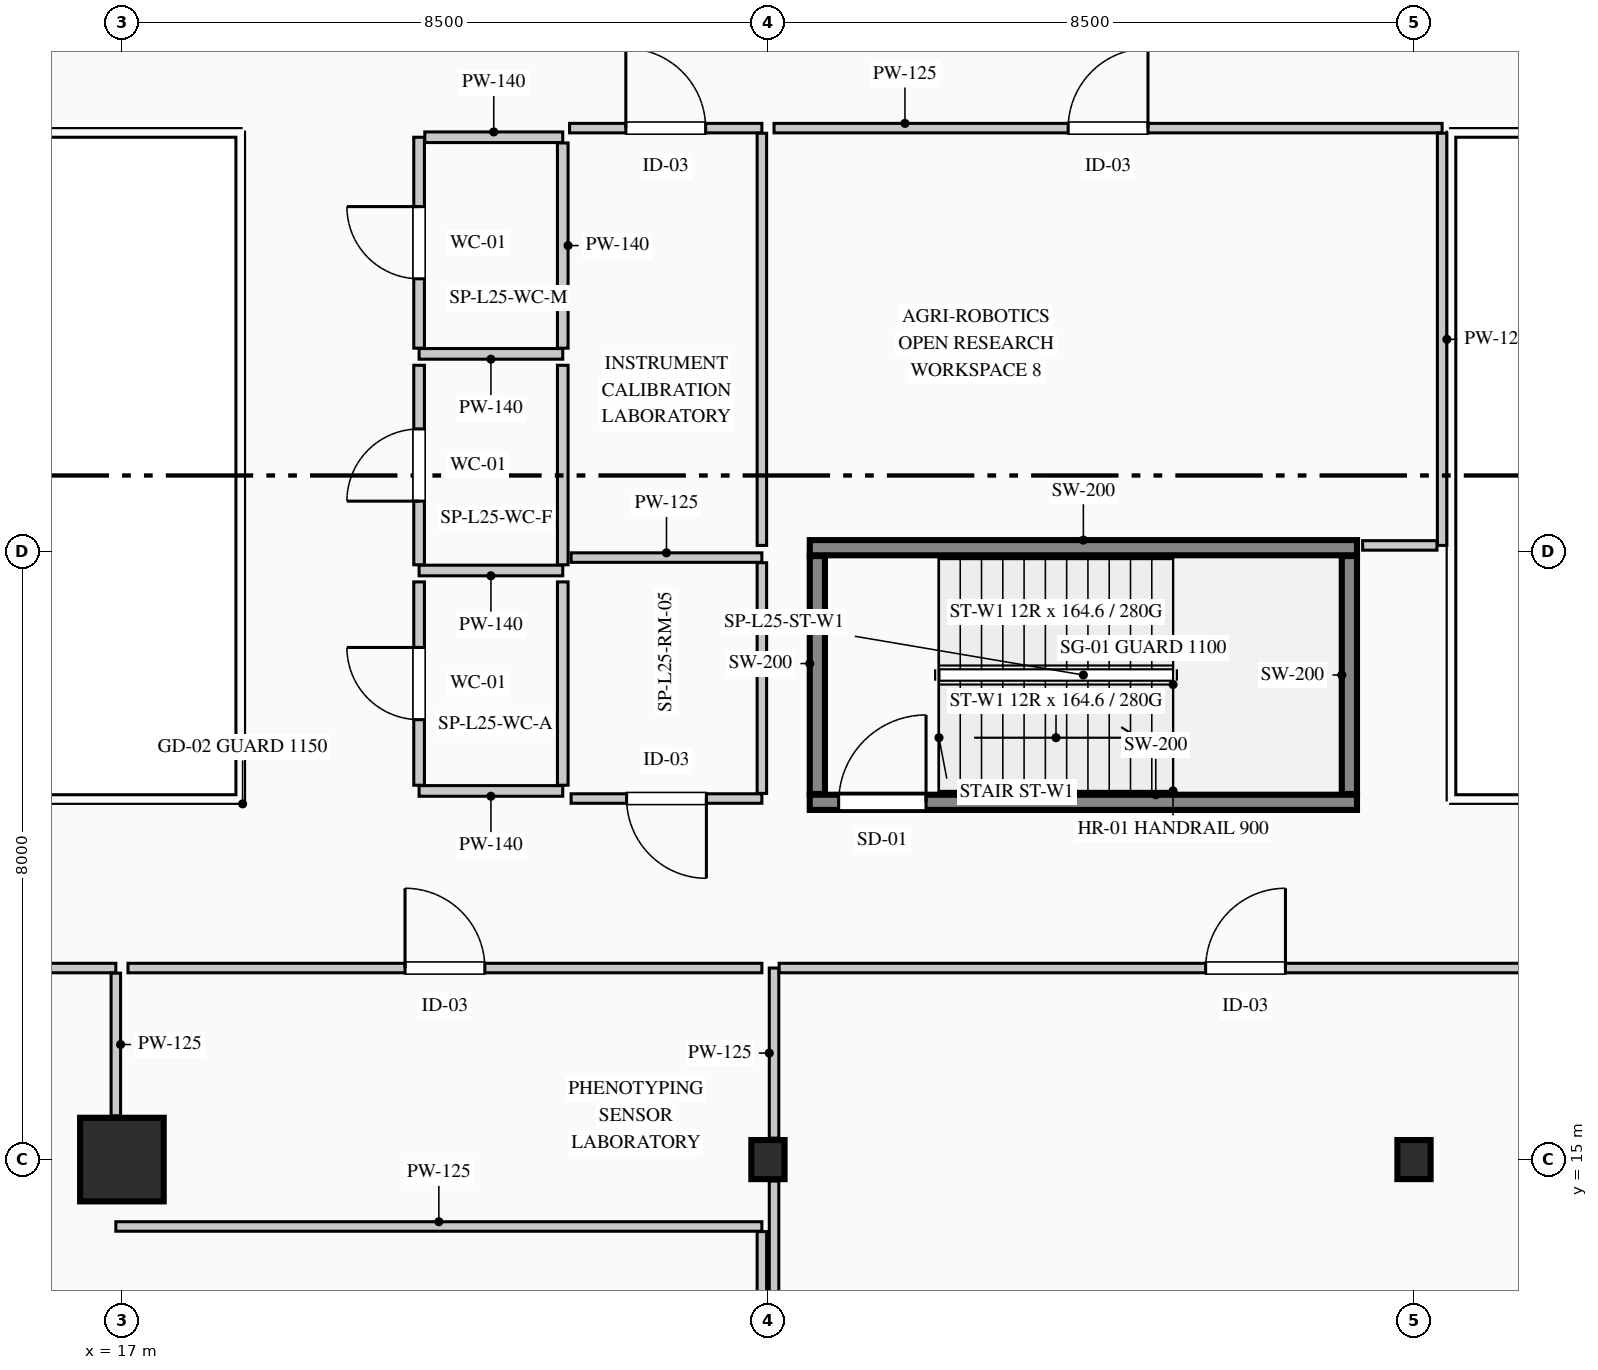
"""IFC4 building model, lengths in metres.
Left out: names, types, materials, properties, quantities, classifications, styles, units other than length and angle.
Written with IfcOpenShell. Run it as: python <this file> out.ifc"""

import sys

from ifc_helpers import new_model, si_unit, direction, frame, frame_2d, origin, origin_2d, place, context, subcontext, project, spatial, rectangle, i_section, extrude, element, fill, save


model = new_model("IFC4")
c1 = context("Model", 3, precision=1e-05, world=origin(), true_north=direction((0.0, 1.0)))
c2 = subcontext(c1, "Body", "Model", "MODEL_VIEW")
j1 = project(units=[si_unit("LENGTHUNIT", "METRE"), si_unit("PLANEANGLEUNIT", "RADIAN")], contexts=[c1])
p1 = place(None, origin())
s1 = spatial("IfcSite", under=j1, at=p1, CompositionType="ELEMENT")
p2 = place(p1, origin())
s2 = spatial("IfcBuilding", under=s1, at=p2, CompositionType="ELEMENT")
p3 = place(p2, frame((0.0, 0.0, 111.4)))
s3 = spatial("IfcBuildingStorey", under=s2, at=p3, CompositionType="ELEMENT", Elevation=111.4)
p4 = place(p3, frame((26.05, 19.7, 0.0), z_axis=(0.0, 0.0, 1.0), x_axis=(1.0, 0.0, 0.0)))
e1 = element("IfcWall", 1, at=p4, inside=s3, PredefinedType="SHEAR", context=c2, shape_type="SweptSolid", body=[
    extrude(rectangle(XDim=7.2, YDim=0.2, at=frame_2d((3.6, 0.0))), origin(), (0.0, 0.0, 1.0), 3.95),
])
p5 = place(p4, frame((0.38, 0.0, 0.0)))
e2 = element("IfcOpeningElement", 2, at=p5, cuts=e1, PredefinedType="OPENING", context=c2, shape_type="SweptSolid", body=[
    extrude(rectangle(XDim=1.15, YDim=2.2, at=frame_2d((0.575, 1.1))), frame((0.0, 0.11, 0.0), z_axis=(0.0, -1.0, 0.0), x_axis=(1.0, 0.0, 0.0)), (0.0, 0.0, 1.0), 0.22),
])
p6 = place(p3, frame((26.05, 23.05, 0.0), z_axis=(0.0, 0.0, 1.0), x_axis=(1.0, 0.0, 0.0)))
e3 = element("IfcWall", 3, at=p6, inside=s3, PredefinedType="SHEAR", context=c2, shape_type="SweptSolid", body=[
    extrude(rectangle(XDim=7.2, YDim=0.2, at=frame_2d((3.6, 0.0))), origin(), (0.0, 0.0, 1.0), 3.95),
])
for number, where, z_axis, x_axis in (
    (4, (26.15, 19.81, 0.0), (0.0, 0.0, 1.0), (0.0, 1.0, 0.0)),
    (5, (33.15, 19.81, 0.0), (0.0, 0.0, 1.0), (0.0, 1.0, 0.0)),
):
    element("IfcWall", number, at=place(p3, frame(where, z_axis=z_axis, x_axis=x_axis)), inside=s3, PredefinedType="SHEAR", context=c2, shape_type="SweptSolid", body=[
        extrude(rectangle(XDim=3.13, YDim=0.2, at=frame_2d((1.565, 0.0))), origin(), (0.0, 0.0, 1.0), 3.95),
    ])
p7 = place(p3, frame((17.0, 15.0, 0.0), z_axis=(0.0, 0.0, 1.0), x_axis=(1.0, 0.0, 0.0)))
e6 = element("IfcColumn", 6, at=p7, inside=s3, PredefinedType="COLUMN", context=c2, shape_type="SweptSolid", body=[
    extrude(rectangle(XDim=1.1, YDim=1.1, at=origin_2d()), origin(), (0.0, 0.0, 1.0), 3.95),
])
for number, where, z_axis, x_axis in (
    (7, (25.5, 15.0, 0.0), (0.0, 0.0, 1.0), (1.0, 0.0, 0.0)),
    (8, (34.0, 15.0, 0.0), (0.0, 0.0, 1.0), (1.0, 0.0, 0.0)),
):
    element("IfcColumn", number, at=place(p3, frame(where, z_axis=z_axis, x_axis=x_axis)), inside=s3, PredefinedType="COLUMN", context=c2, shape_type="SweptSolid", body=[
        extrude(i_section(OverallWidth=0.437, OverallDepth=0.514, WebThickness=0.061, FlangeThickness=0.077, FilletRadius=0.015, at=origin_2d()), origin(), (0.0, 0.0, 1.0), 3.95),
    ])
p8 = place(p3, frame((22.8, 25.6, 0.0), z_axis=(0.0, 0.0, 1.0), x_axis=(-1.0, 0.0, 0.0)))
e9 = element("IfcWall", 9, at=p8, inside=s3, PredefinedType="PARTITIONING", context=c2, shape_type="SweptSolid", body=[
    extrude(rectangle(XDim=1.89, YDim=0.14, at=frame_2d((0.945, 0.0))), origin(), (0.0, 0.0, 1.0), 3.69),
])
p9 = place(p3, frame((20.91, 25.675, 0.0), z_axis=(0.0, 0.0, 1.0), x_axis=(0.0, 1.0, 0.0)))
e10 = element("IfcWall", 10, at=p9, inside=s3, PredefinedType="PARTITIONING", context=c2, shape_type="SweptSolid", body=[
    extrude(rectangle(XDim=2.775, YDim=0.14, at=frame_2d((1.387, 0.0))), origin(), (0.0, 0.0, 1.0), 3.69),
])
p10 = place(p9, frame((0.913, 0.0, 0.0)))
e11 = element("IfcOpeningElement", 11, at=p10, cuts=e10, PredefinedType="OPENING", context=c2, shape_type="SweptSolid", body=[
    extrude(rectangle(XDim=0.95, YDim=2.15, at=frame_2d((0.475, 1.075))), frame((0.0, 0.08, 0.0), z_axis=(0.0, -1.0, 0.0), x_axis=(1.0, 0.0, 0.0)), (0.0, 0.0, 1.0), 0.16),
])
p11 = place(p3, frame((20.985, 28.45, 0.0), z_axis=(0.0, 0.0, 1.0), x_axis=(1.0, 0.0, 0.0)))
e12 = element("IfcWall", 12, at=p11, inside=s3, PredefinedType="PARTITIONING", context=c2, shape_type="SweptSolid", body=[
    extrude(rectangle(XDim=1.815, YDim=0.14, at=frame_2d((0.907, 0.0))), origin(), (0.0, 0.0, 1.0), 3.69),
])
p12 = place(p3, frame((22.8, 28.375, 0.0), z_axis=(0.0, 0.0, 1.0), x_axis=(0.0, -1.0, 0.0)))
e13 = element("IfcWall", 13, at=p12, inside=s3, PredefinedType="PARTITIONING", context=c2, shape_type="SweptSolid", body=[
    extrude(rectangle(XDim=2.7, YDim=0.14, at=frame_2d((1.35, 0.0))), origin(), (0.0, 0.0, 1.0), 3.315),
])
p13 = place(p3, frame((22.8, 22.75, 0.0), z_axis=(0.0, 0.0, 1.0), x_axis=(-1.0, 0.0, 0.0)))
e14 = element("IfcWall", 14, at=p13, inside=s3, PredefinedType="PARTITIONING", context=c2, shape_type="SweptSolid", body=[
    extrude(rectangle(XDim=1.89, YDim=0.14, at=frame_2d((0.945, 0.0))), origin(), (0.0, 0.0, 1.0), 3.69),
])
p14 = place(p3, frame((20.91, 22.825, 0.0), z_axis=(0.0, 0.0, 1.0), x_axis=(0.0, 1.0, 0.0)))
e15 = element("IfcWall", 15, at=p14, inside=s3, PredefinedType="PARTITIONING", context=c2, shape_type="SweptSolid", body=[
    extrude(rectangle(XDim=2.625, YDim=0.14, at=frame_2d((1.312, 0.0))), origin(), (0.0, 0.0, 1.0), 3.69),
])
p15 = place(p14, frame((0.837, 0.0, 0.0)))
e16 = element("IfcOpeningElement", 16, at=p15, cuts=e15, PredefinedType="OPENING", context=c2, shape_type="SweptSolid", body=[
    extrude(rectangle(XDim=0.95, YDim=2.15, at=frame_2d((0.475, 1.075))), frame((0.0, 0.08, 0.0), z_axis=(0.0, -1.0, 0.0), x_axis=(1.0, 0.0, 0.0)), (0.0, 0.0, 1.0), 0.16),
])
p16 = place(p3, frame((22.8, 25.45, 0.0), z_axis=(0.0, 0.0, 1.0), x_axis=(0.0, -1.0, 0.0)))
e17 = element("IfcWall", 17, at=p16, inside=s3, PredefinedType="PARTITIONING", context=c2, shape_type="SweptSolid", body=[
    extrude(rectangle(XDim=2.625, YDim=0.14, at=frame_2d((1.312, 0.0))), origin(), (0.0, 0.0, 1.0), 3.315),
])
p17 = place(p3, frame((22.8, 19.85, 0.0), z_axis=(0.0, 0.0, 1.0), x_axis=(-1.0, 0.0, 0.0)))
e18 = element("IfcWall", 18, at=p17, inside=s3, PredefinedType="PARTITIONING", context=c2, shape_type="SweptSolid", body=[
    extrude(rectangle(XDim=1.89, YDim=0.14, at=frame_2d((0.945, 0.0))), origin(), (0.0, 0.0, 1.0), 3.69),
])
p18 = place(p3, frame((20.91, 19.925, 0.0), z_axis=(0.0, 0.0, 1.0), x_axis=(0.0, 1.0, 0.0)))
e19 = element("IfcWall", 19, at=p18, inside=s3, PredefinedType="PARTITIONING", context=c2, shape_type="SweptSolid", body=[
    extrude(rectangle(XDim=2.675, YDim=0.14, at=frame_2d((1.337, 0.0))), origin(), (0.0, 0.0, 1.0), 3.69),
])
p19 = place(p18, frame((0.863, 0.0, 0.0)))
e20 = element("IfcOpeningElement", 20, at=p19, cuts=e19, PredefinedType="OPENING", context=c2, shape_type="SweptSolid", body=[
    extrude(rectangle(XDim=0.95, YDim=2.15, at=frame_2d((0.475, 1.075))), frame((0.0, 0.08, 0.0), z_axis=(0.0, -1.0, 0.0), x_axis=(1.0, 0.0, 0.0)), (0.0, 0.0, 1.0), 0.16),
])
p20 = place(p3, frame((22.8, 22.6, 0.0), z_axis=(0.0, 0.0, 1.0), x_axis=(0.0, -1.0, 0.0)))
e21 = element("IfcWall", 21, at=p20, inside=s3, PredefinedType="PARTITIONING", context=c2, shape_type="SweptSolid", body=[
    extrude(rectangle(XDim=2.675, YDim=0.14, at=frame_2d((1.337, 0.0))), origin(), (0.0, 0.0, 1.0), 3.315),
])
p21 = place(p3, frame((6.36, 17.52, 0.0), z_axis=(0.0, 0.0, 1.0), x_axis=(1.0, 0.0, 0.0)))
e22 = element("IfcWall", 22, at=p21, inside=s3, PredefinedType="PARTITIONING", context=c2, shape_type="SweptSolid", body=[
    extrude(rectangle(XDim=10.56, YDim=0.125, at=frame_2d((5.28, 0.0))), origin(), (0.0, 0.0, 1.0), 3.69),
])
p22 = place(p21, frame((4.755, 0.0, 0.0)))
e23 = element("IfcOpeningElement", 23, at=p22, cuts=e22, PredefinedType="OPENING", context=c2, shape_type="SweptSolid", body=[
    extrude(rectangle(XDim=1.05, YDim=2.15, at=frame_2d((0.525, 1.075))), frame((0.0, 0.073, 0.0), z_axis=(0.0, -1.0, 0.0), x_axis=(1.0, 0.0, 0.0)), (0.0, 0.0, 1.0), 0.145),
])
p23 = place(p3, frame((16.92, 17.452, 0.0), z_axis=(0.0, 0.0, 1.0), x_axis=(0.0, -1.0, 0.0)))
e24 = element("IfcWall", 24, at=p23, inside=s3, PredefinedType="PARTITIONING", context=c2, shape_type="SweptSolid", body=[
    extrude(rectangle(XDim=1.877, YDim=0.125, at=frame_2d((0.939, 0.0))), origin(), (0.0, 0.0, 1.0), 3.69),
])
p24 = place(p3, frame((16.92, 14.12, 0.0), z_axis=(0.0, 0.0, 1.0), x_axis=(1.0, 0.0, 0.0)))
e25 = element("IfcWall", 25, at=p24, inside=s3, PredefinedType="PARTITIONING", context=c2, shape_type="SweptSolid", body=[
    extrude(rectangle(XDim=8.5, YDim=0.125, at=frame_2d((4.25, 0.0))), origin(), (0.0, 0.0, 1.0), 3.69),
])
p25 = place(p3, frame((25.42, 14.052, 0.0), z_axis=(0.0, 0.0, 1.0), x_axis=(0.0, -1.0, 0.0)))
e26 = element("IfcWall", 26, at=p25, inside=s3, PredefinedType="PARTITIONING", context=c2, shape_type="SweptSolid", body=[
    extrude(rectangle(XDim=1.038, YDim=0.125, at=frame_2d((0.519, 0.0))), origin(), (0.0, 0.0, 1.0), 3.69),
])
p26 = place(p3, frame((25.58, 13.015, 0.0), z_axis=(0.0, 0.0, 1.0), x_axis=(0.0, 1.0, 0.0)))
e27 = element("IfcWall", 27, at=p26, inside=s3, PredefinedType="PARTITIONING", context=c2, shape_type="SweptSolid", body=[
    extrude(rectangle(XDim=1.703, YDim=0.125, at=frame_2d((0.852, 0.0))), origin(), (0.0, 0.0, 1.0), 3.69),
])
p27 = place(p3, frame((25.58, 15.282, 0.0), z_axis=(0.0, 0.0, 1.0), x_axis=(0.0, 1.0, 0.0)))
e28 = element("IfcWall", 28, at=p27, inside=s3, PredefinedType="PARTITIONING", context=c2, shape_type="SweptSolid", body=[
    extrude(rectangle(XDim=2.238, YDim=0.125, at=frame_2d((1.119, 0.0))), origin(), (0.0, 0.0, 1.0), 2.875),
])
p28 = place(p3, frame((25.647, 17.52, 0.0), z_axis=(0.0, 0.0, 1.0), x_axis=(1.0, 0.0, 0.0)))
e29 = element("IfcWall", 29, at=p28, inside=s3, PredefinedType="PARTITIONING", context=c2, shape_type="SweptSolid", body=[
    extrude(rectangle(XDim=12.272, YDim=0.125, at=frame_2d((6.136, 0.0))), origin(), (0.0, 0.0, 1.0), 3.475),
])
p29 = place(p28, frame((5.611, 0.0, 0.0)))
e30 = element("IfcOpeningElement", 30, at=p29, cuts=e29, PredefinedType="OPENING", context=c2, shape_type="SweptSolid", body=[
    extrude(rectangle(XDim=1.05, YDim=2.15, at=frame_2d((0.525, 1.075))), frame((0.0, 0.073, 0.0), z_axis=(0.0, -1.0, 0.0), x_axis=(1.0, 0.0, 0.0)), (0.0, 0.0, 1.0), 0.145),
])
p30 = place(p3, frame((17.08, 17.52, 0.0), z_axis=(0.0, 0.0, 1.0), x_axis=(1.0, 0.0, 0.0)))
e31 = element("IfcWall", 31, at=p30, inside=s3, PredefinedType="PARTITIONING", context=c2, shape_type="SweptSolid", body=[
    extrude(rectangle(XDim=8.34, YDim=0.125, at=frame_2d((4.17, 0.0))), origin(), (0.0, 0.0, 1.0), 3.69),
])
p31 = place(p30, frame((3.645, 0.0, 0.0)))
e32 = element("IfcOpeningElement", 32, at=p31, cuts=e31, PredefinedType="OPENING", context=c2, shape_type="SweptSolid", body=[
    extrude(rectangle(XDim=1.05, YDim=2.15, at=frame_2d((0.525, 1.075))), frame((0.0, 0.073, 0.0), z_axis=(0.0, -1.0, 0.0), x_axis=(1.0, 0.0, 0.0)), (0.0, 0.0, 1.0), 0.145),
])
p32 = place(p3, frame((25.42, 19.75, 0.0), z_axis=(0.0, 0.0, 1.0), x_axis=(-1.0, 0.0, 0.0)))
e33 = element("IfcWall", 33, at=p32, inside=s3, PredefinedType="PARTITIONING", context=c2, shape_type="SweptSolid", body=[
    extrude(rectangle(XDim=2.51, YDim=0.125, at=frame_2d((1.255, 0.0))), origin(), (0.0, 0.0, 1.0), 3.69),
])
p33 = place(p32, frame((0.73, 0.0, 0.0)))
e34 = element("IfcOpeningElement", 34, at=p33, cuts=e33, PredefinedType="OPENING", context=c2, shape_type="SweptSolid", body=[
    extrude(rectangle(XDim=1.05, YDim=2.15, at=frame_2d((0.525, 1.075))), frame((0.0, 0.073, 0.0), z_axis=(0.0, -1.0, 0.0), x_axis=(1.0, 0.0, 0.0)), (0.0, 0.0, 1.0), 0.145),
])
p34 = place(p3, frame((22.91, 22.92, 0.0), z_axis=(0.0, 0.0, 1.0), x_axis=(1.0, 0.0, 0.0)))
e35 = element("IfcWall", 35, at=p34, inside=s3, PredefinedType="PARTITIONING", context=c2, shape_type="SweptSolid", body=[
    extrude(rectangle(XDim=2.51, YDim=0.125, at=frame_2d((1.255, 0.0))), origin(), (0.0, 0.0, 1.0), 3.69),
])
p35 = place(p3, frame((25.42, 22.853, 0.0), z_axis=(0.0, 0.0, 1.0), x_axis=(0.0, -1.0, 0.0)))
e36 = element("IfcWall", 36, at=p35, inside=s3, PredefinedType="PARTITIONING", context=c2, shape_type="SweptSolid", body=[
    extrude(rectangle(XDim=3.035, YDim=0.125, at=frame_2d((1.518, 0.0))), origin(), (0.0, 0.0, 1.0), 2.875),
])
p36 = place(p3, frame((22.89, 28.57, 0.0), z_axis=(0.0, 0.0, 1.0), x_axis=(1.0, 0.0, 0.0)))
e37 = element("IfcWall", 37, at=p36, inside=s3, PredefinedType="PARTITIONING", context=c2, shape_type="SweptSolid", body=[
    extrude(rectangle(XDim=2.53, YDim=0.125, at=frame_2d((1.265, 0.0))), origin(), (0.0, 0.0, 1.0), 3.69),
])
p37 = place(p36, frame((0.74, 0.0, 0.0)))
e38 = element("IfcOpeningElement", 38, at=p37, cuts=e37, PredefinedType="OPENING", context=c2, shape_type="SweptSolid", body=[
    extrude(rectangle(XDim=1.05, YDim=2.15, at=frame_2d((0.525, 1.075))), frame((0.0, 0.073, 0.0), z_axis=(0.0, -1.0, 0.0), x_axis=(1.0, 0.0, 0.0)), (0.0, 0.0, 1.0), 0.145),
])
p38 = place(p3, frame((25.42, 28.502, 0.0), z_axis=(0.0, 0.0, 1.0), x_axis=(0.0, -1.0, 0.0)))
e39 = element("IfcWall", 39, at=p38, inside=s3, PredefinedType="PARTITIONING", context=c2, shape_type="SweptSolid", body=[
    extrude(rectangle(XDim=5.422, YDim=0.125, at=frame_2d((2.711, 0.0))), origin(), (0.0, 0.0, 1.0), 2.875),
])
p39 = place(p3, frame((25.58, 28.57, 0.0), z_axis=(0.0, 0.0, 1.0), x_axis=(1.0, 0.0, 0.0)))
e40 = element("IfcWall", 40, at=p39, inside=s3, PredefinedType="PARTITIONING", context=c2, shape_type="SweptSolid", body=[
    extrude(rectangle(XDim=8.79, YDim=0.125, at=frame_2d((4.395, 0.0))), origin(), (0.0, 0.0, 1.0), 3.475),
])
p40 = place(p39, frame((3.87, 0.0, 0.0)))
e41 = element("IfcOpeningElement", 41, at=p40, cuts=e40, PredefinedType="OPENING", context=c2, shape_type="SweptSolid", body=[
    extrude(rectangle(XDim=1.05, YDim=2.15, at=frame_2d((0.525, 1.075))), frame((0.0, 0.073, 0.0), z_axis=(0.0, -1.0, 0.0), x_axis=(1.0, 0.0, 0.0)), (0.0, 0.0, 1.0), 0.145),
])
p41 = place(p3, frame((34.37, 28.502, 0.0), z_axis=(0.0, 0.0, 1.0), x_axis=(0.0, -1.0, 0.0)))
e42 = element("IfcWall", 42, at=p41, inside=s3, PredefinedType="PARTITIONING", context=c2, shape_type="SweptSolid", body=[
    extrude(rectangle(XDim=5.422, YDim=0.125, at=frame_2d((2.711, 0.0))), origin(), (0.0, 0.0, 1.0), 3.69),
])
p42 = place(p3, frame((34.302, 23.08, 0.0), z_axis=(0.0, 0.0, 1.0), x_axis=(-1.0, 0.0, 0.0)))
e43 = element("IfcWall", 43, at=p42, inside=s3, PredefinedType="PARTITIONING", context=c2, shape_type="SweptSolid", body=[
    extrude(rectangle(XDim=0.978, YDim=0.125, at=frame_2d((0.489, 0.0))), origin(), (0.0, 0.0, 1.0), 3.69),
])
p43 = place(p5, origin())
e44 = element("IfcDoor", 44, at=p43, inside=s3, OperationType="SINGLE_SWING_RIGHT", PredefinedType="DOOR", context=c2, shape_type="SweptSolid", body=[
    extrude(rectangle(XDim=1.15, YDim=2.2, at=frame_2d((0.575, 1.1))), frame((0.0, 0.025, 0.0), z_axis=(0.0, -1.0, 0.0), x_axis=(1.0, 0.0, 0.0)), (0.0, 0.0, 1.0), 0.05),
])
fill(e2, e44)
p44 = place(p10, origin())
e45 = element("IfcDoor", 45, at=p44, inside=s3, OperationType="SINGLE_SWING_RIGHT", PredefinedType="DOOR", context=c2, shape_type="SweptSolid", body=[
    extrude(rectangle(XDim=0.95, YDim=2.15, at=frame_2d((0.475, 1.075))), frame((0.0, 0.025, 0.0), z_axis=(0.0, -1.0, 0.0), x_axis=(1.0, 0.0, 0.0)), (0.0, 0.0, 1.0), 0.05),
])
fill(e11, e45)
p45 = place(p15, origin())
e46 = element("IfcDoor", 46, at=p45, inside=s3, OperationType="SINGLE_SWING_LEFT", PredefinedType="DOOR", context=c2, shape_type="SweptSolid", body=[
    extrude(rectangle(XDim=0.95, YDim=2.15, at=frame_2d((0.475, 1.075))), frame((0.0, 0.025, 0.0), z_axis=(0.0, -1.0, 0.0), x_axis=(1.0, 0.0, 0.0)), (0.0, 0.0, 1.0), 0.05),
])
fill(e16, e46)
p46 = place(p19, origin())
e47 = element("IfcDoor", 47, at=p46, inside=s3, OperationType="SINGLE_SWING_RIGHT", PredefinedType="DOOR", context=c2, shape_type="SweptSolid", body=[
    extrude(rectangle(XDim=0.95, YDim=2.15, at=frame_2d((0.475, 1.075))), frame((0.0, 0.025, 0.0), z_axis=(0.0, -1.0, 0.0), x_axis=(1.0, 0.0, 0.0)), (0.0, 0.0, 1.0), 0.05),
])
fill(e20, e47)
p47 = place(p29, origin())
e48 = element("IfcDoor", 48, at=p47, inside=s3, OperationType="SINGLE_SWING_RIGHT", PredefinedType="DOOR", context=c2, shape_type="SweptSolid", body=[
    extrude(rectangle(XDim=1.05, YDim=2.15, at=frame_2d((0.525, 1.075))), frame((0.0, 0.025, 0.0), z_axis=(0.0, -1.0, 0.0), x_axis=(1.0, 0.0, 0.0)), (0.0, 0.0, 1.0), 0.05),
])
fill(e30, e48)
p48 = place(p31, origin())
e49 = element("IfcDoor", 49, at=p48, inside=s3, OperationType="SINGLE_SWING_LEFT", PredefinedType="DOOR", context=c2, shape_type="SweptSolid", body=[
    extrude(rectangle(XDim=1.05, YDim=2.15, at=frame_2d((0.525, 1.075))), frame((0.0, 0.025, 0.0), z_axis=(0.0, -1.0, 0.0), x_axis=(1.0, 0.0, 0.0)), (0.0, 0.0, 1.0), 0.05),
])
fill(e32, e49)
p49 = place(p33, origin())
e50 = element("IfcDoor", 50, at=p49, inside=s3, OperationType="SINGLE_SWING_LEFT", PredefinedType="DOOR", context=c2, shape_type="SweptSolid", body=[
    extrude(rectangle(XDim=1.05, YDim=2.15, at=frame_2d((0.525, 1.075))), frame((0.0, 0.025, 0.0), z_axis=(0.0, -1.0, 0.0), x_axis=(1.0, 0.0, 0.0)), (0.0, 0.0, 1.0), 0.05),
])
fill(e34, e50)
p50 = place(p37, origin())
e51 = element("IfcDoor", 51, at=p50, inside=s3, OperationType="SINGLE_SWING_LEFT", PredefinedType="DOOR", context=c2, shape_type="SweptSolid", body=[
    extrude(rectangle(XDim=1.05, YDim=2.15, at=frame_2d((0.525, 1.075))), frame((0.0, 0.025, 0.0), z_axis=(0.0, -1.0, 0.0), x_axis=(1.0, 0.0, 0.0)), (0.0, 0.0, 1.0), 0.05),
])
fill(e38, e51)
p51 = place(p40, origin())
e52 = element("IfcDoor", 52, at=p51, inside=s3, OperationType="SINGLE_SWING_RIGHT", PredefinedType="DOOR", context=c2, shape_type="SweptSolid", body=[
    extrude(rectangle(XDim=1.05, YDim=2.15, at=frame_2d((0.525, 1.075))), frame((0.0, 0.025, 0.0), z_axis=(0.0, -1.0, 0.0), x_axis=(1.0, 0.0, 0.0)), (0.0, 0.0, 1.0), 0.05),
])
fill(e41, e52)
save(model, sys.argv[1])
